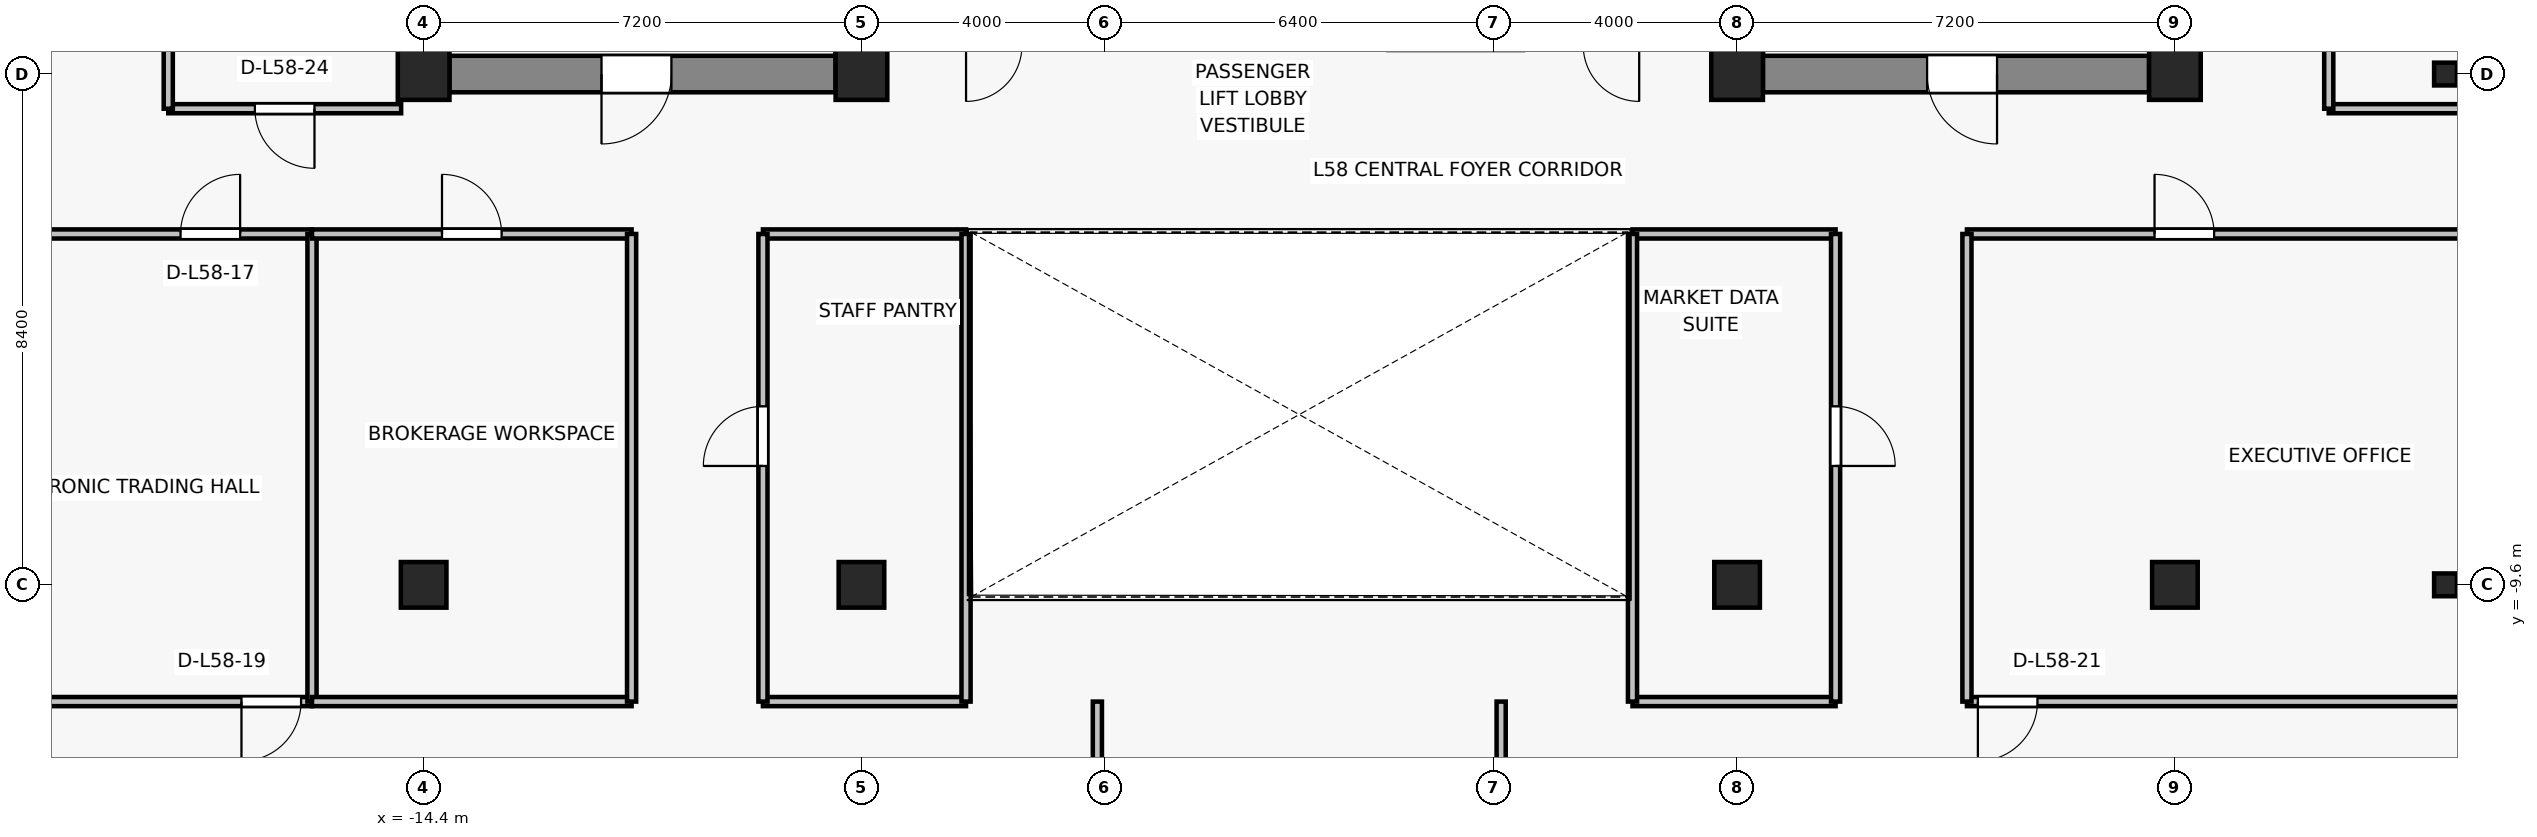
"""IFC4 building model, lengths in metres.
Left out: names, types, materials, properties, quantities, classifications, styles, units other than length and angle.
Written with IfcOpenShell. Run it as: python <this file> out.ifc"""

import sys

from ifc_helpers import new_model, si_unit, direction, frame, frame_2d, origin, origin_2d, place, context, subcontext, project, spatial, rectangle, i_section, extrude, source, transform, mapped, element, fill, save


model = new_model("IFC4")
c1 = context("Model", 3, precision=1e-05, world=origin(), true_north=direction((0.0, 1.0)))
c2 = subcontext(c1, "Body", "Model", "MODEL_VIEW")
j1 = project(units=[si_unit("LENGTHUNIT", "METRE"), si_unit("PLANEANGLEUNIT", "RADIAN")], contexts=[c1])
p1 = place(None, origin())
s1 = spatial("IfcSite", under=j1, at=p1, CompositionType="ELEMENT")
p2 = place(p1, origin())
s2 = spatial("IfcBuilding", under=s1, at=p2, CompositionType="ELEMENT")
p3 = place(p2, frame((0.0, 0.0, 208.9)))
s3 = spatial("IfcBuildingStorey", under=s2, at=p3, CompositionType="ELEMENT", Elevation=208.9)
for number, where, z_axis, x_axis in (
    (1, (-14.4, -1.2, 0.0), (0.0, 0.0, 1.0), (1.0, 0.0, 0.0)),
    (2, (-7.2, -1.2, 0.0), (0.0, 0.0, 1.0), (1.0, 0.0, 0.0)),
    (3, (7.2, -1.2, 0.0), (0.0, 0.0, 1.0), (1.0, 0.0, 0.0)),
    (4, (14.4, -1.2, 0.0), (0.0, 0.0, 1.0), (1.0, 0.0, 0.0)),
):
    element("IfcColumn", number, at=place(p3, frame(where, z_axis=z_axis, x_axis=x_axis)), inside=s3, PredefinedType="COLUMN", context=c2, shape_type="SweptSolid", body=[
        extrude(rectangle(XDim=0.85, YDim=0.85, at=origin_2d()), origin(), (0.0, 0.0, 1.0), 3.3),
    ])
for number, where, z_axis, x_axis in (
    (5, (-14.4, -9.6, 0.0), (0.0, 0.0, 1.0), (1.0, 0.0, 0.0)),
    (6, (-7.2, -9.6, 0.0), (0.0, 0.0, 1.0), (1.0, 0.0, 0.0)),
    (7, (7.2, -9.6, 0.0), (0.0, 0.0, 1.0), (1.0, 0.0, 0.0)),
    (8, (14.4, -9.6, 0.0), (0.0, 0.0, 1.0), (1.0, 0.0, 0.0)),
):
    element("IfcColumn", number, at=place(p3, frame(where, z_axis=z_axis, x_axis=x_axis)), inside=s3, PredefinedType="COLUMN", context=c2, shape_type="SweptSolid", body=[
        extrude(rectangle(XDim=0.75, YDim=0.75, at=origin_2d()), origin(), (0.0, 0.0, 1.0), 3.3),
    ])
for number, where, z_axis, x_axis in (
    (9, (18.85, -9.6, 0.0), (0.0, 0.0, 1.0), (1.0, 0.0, 0.0)),
    (10, (18.85, -1.2, 0.0), (0.0, 0.0, 1.0), (1.0, 0.0, 0.0)),
):
    element("IfcColumn", number, at=place(p3, frame(where, z_axis=z_axis, x_axis=x_axis)), inside=s3, PredefinedType="COLUMN", context=c2, shape_type="SweptSolid", body=[
        extrude(i_section(OverallWidth=0.375, OverallDepth=0.375, WebThickness=0.017, FlangeThickness=0.027, FilletRadius=0.015, at=origin_2d()), origin(), (0.0, 0.0, 1.0), 3.3),
    ])
p4 = place(p3, frame((-7.625, -1.2, 0.0), z_axis=(0.0, 0.0, 1.0), x_axis=(-1.0, 0.0, 0.0)))
e11 = element("IfcWall", 11, at=p4, inside=s3, PredefinedType="SHEAR", context=c2, shape_type="SweptSolid", body=[
    extrude(rectangle(XDim=6.35, YDim=0.6, at=frame_2d((3.175, 0.0))), origin(), (0.0, 0.0, 1.0), 3.075),
])
p5 = place(p4, frame((2.7, 0.0, 0.0)))
e12 = element("IfcOpeningElement", 12, at=p5, cuts=e11, PredefinedType="OPENING", context=c2, shape_type="SweptSolid", body=[
    extrude(rectangle(XDim=1.15, YDim=2.15, at=frame_2d((0.575, 1.075))), frame((0.0, 0.31, 0.0), z_axis=(0.0, -1.0, 0.0), x_axis=(1.0, 0.0, 0.0)), (0.0, 0.0, 1.0), 0.62),
])
p6 = place(p3, frame((13.975, -1.2, 0.0), z_axis=(0.0, 0.0, 1.0), x_axis=(-1.0, 0.0, 0.0)))
e13 = element("IfcWall", 13, at=p6, inside=s3, PredefinedType="SHEAR", context=c2, shape_type="SweptSolid", body=[
    extrude(rectangle(XDim=6.35, YDim=0.6, at=frame_2d((3.175, 0.0))), origin(), (0.0, 0.0, 1.0), 3.075),
])
p7 = place(p6, frame((2.5, 0.0, 0.0)))
e14 = element("IfcOpeningElement", 14, at=p7, cuts=e13, PredefinedType="OPENING", context=c2, shape_type="SweptSolid", body=[
    extrude(rectangle(XDim=1.15, YDim=2.15, at=frame_2d((0.575, 1.075))), frame((0.0, 0.31, 0.0), z_axis=(0.0, -1.0, 0.0), x_axis=(1.0, 0.0, 0.0)), (0.0, 0.0, 1.0), 0.62),
])
for number, where, z_axis, x_axis in (
    (15, (-7.4, -0.9, 0.0), (0.0, 0.0, 1.0), (0.0, 1.0, 0.0)),
    (16, (7.4, -0.9, 0.0), (0.0, 0.0, 1.0), (0.0, 1.0, 0.0)),
):
    element("IfcWall", number, at=place(p3, frame(where, z_axis=z_axis, x_axis=x_axis)), inside=s3, PredefinedType="SHEAR", context=c2, shape_type="SweptSolid", body=[
        extrude(rectangle(XDim=4.15, YDim=0.45, at=frame_2d((2.075, 0.0))), origin(), (0.0, 0.0, 1.0), 3.075),
    ])
p8 = place(p3, frame((-16.236, -11.52, 0.0), z_axis=(0.0, 0.0, 1.0), x_axis=(-1.0, 0.0, 0.0)))
e17 = element("IfcWall", 17, at=p8, inside=s3, PredefinedType="PARTITIONING", context=c2, shape_type="SweptSolid", body=[
    extrude(rectangle(XDim=7.294, YDim=0.15, at=frame_2d((3.647, 0.0))), origin(), (0.0, 0.0, 1.0), 3.075),
])
p9 = place(p8, frame((0.18, 0.0, 0.0)))
e18 = element("IfcOpeningElement", 18, at=p9, cuts=e17, PredefinedType="OPENING", context=c2, shape_type="SweptSolid", body=[
    extrude(rectangle(XDim=0.98, YDim=2.15, at=frame_2d((0.49, 1.075))), frame((0.0, 0.085, 0.0), z_axis=(0.0, -1.0, 0.0), x_axis=(1.0, 0.0, 0.0)), (0.0, 0.0, 1.0), 0.17),
])
p10 = place(p3, frame((-23.53, -3.83, 0.0), z_axis=(0.0, 0.0, 1.0), x_axis=(1.0, 0.0, 0.0)))
e19 = element("IfcWall", 19, at=p10, inside=s3, PredefinedType="PARTITIONING", context=c2, shape_type="SweptSolid", body=[
    extrude(rectangle(XDim=7.294, YDim=0.15, at=frame_2d((3.647, 0.0))), origin(), (0.0, 0.0, 1.0), 2.765),
])
p11 = place(p10, frame((5.132, 0.0, 0.0)))
e20 = element("IfcOpeningElement", 20, at=p11, cuts=e19, PredefinedType="OPENING", context=c2, shape_type="SweptSolid", body=[
    extrude(rectangle(XDim=0.98, YDim=2.15, at=frame_2d((0.49, 1.075))), frame((0.0, 0.085, 0.0), z_axis=(0.0, -1.0, 0.0), x_axis=(1.0, 0.0, 0.0)), (0.0, 0.0, 1.0), 0.17),
])
p12 = place(p3, frame((-16.236, -3.83, 0.0), z_axis=(0.0, 0.0, 1.0), x_axis=(0.0, -1.0, 0.0)))
e21 = element("IfcWall", 21, at=p12, inside=s3, PredefinedType="PARTITIONING", context=c2, shape_type="SweptSolid", body=[
    extrude(rectangle(XDim=7.69, YDim=0.15, at=frame_2d((3.845, 0.0))), origin(), (0.0, 0.0, 1.0), 2.615),
])
p13 = place(p3, frame((-10.98, -11.52, 0.0), z_axis=(0.0, 0.0, 1.0), x_axis=(-1.0, 0.0, 0.0)))
e22 = element("IfcWall", 22, at=p13, inside=s3, PredefinedType="PARTITIONING", context=c2, shape_type="SweptSolid", body=[
    extrude(rectangle(XDim=5.256, YDim=0.15, at=frame_2d((2.628, 0.0))), origin(), (0.0, 0.0, 1.0), 2.615),
])
p14 = place(p3, frame((-16.236, -3.83, 0.0), z_axis=(0.0, 0.0, 1.0), x_axis=(1.0, 0.0, 0.0)))
e23 = element("IfcWall", 23, at=p14, inside=s3, PredefinedType="PARTITIONING", context=c2, shape_type="SweptSolid", body=[
    extrude(rectangle(XDim=5.256, YDim=0.15, at=frame_2d((2.628, 0.0))), origin(), (0.0, 0.0, 1.0), 2.615),
])
p15 = place(p14, frame((2.138, 0.0, 0.0)))
e24 = element("IfcOpeningElement", 24, at=p15, cuts=e23, PredefinedType="OPENING", context=c2, shape_type="SweptSolid", body=[
    extrude(rectangle(XDim=0.98, YDim=2.15, at=frame_2d((0.49, 1.075))), frame((0.0, 0.085, 0.0), z_axis=(0.0, -1.0, 0.0), x_axis=(1.0, 0.0, 0.0)), (0.0, 0.0, 1.0), 0.17),
])
p16 = place(p3, frame((-10.98, -3.83, 0.0), z_axis=(0.0, 0.0, 1.0), x_axis=(0.0, -1.0, 0.0)))
e25 = element("IfcWall", 25, at=p16, inside=s3, PredefinedType="PARTITIONING", context=c2, shape_type="SweptSolid", body=[
    extrude(rectangle(XDim=7.69, YDim=0.15, at=frame_2d((3.845, 0.0))), origin(), (0.0, 0.0, 1.0), 2.615),
])
p17 = place(p3, frame((-3.32, -11.52, 0.0), z_axis=(0.0, 0.0, 1.0), x_axis=(0.0, -1.0, 0.0)))
e26 = element("IfcWall", 26, at=p17, inside=s3, PredefinedType="PARTITIONING", context=c2, shape_type="SweptSolid", body=[
    extrude(rectangle(XDim=5.51, YDim=0.15, at=frame_2d((2.755, 0.0))), origin(), (0.0, 0.0, 1.0), 2.615),
])
p18 = place(p3, frame((19.53, -11.52, 0.0), z_axis=(0.0, 0.0, 1.0), x_axis=(-1.0, 0.0, 0.0)))
e27 = element("IfcWall", 27, at=p18, inside=s3, PredefinedType="PARTITIONING", context=c2, shape_type="SweptSolid", body=[
    extrude(rectangle(XDim=8.55, YDim=0.15, at=frame_2d((4.275, 0.0))), origin(), (0.0, 0.0, 1.0), 2.615),
])
p19 = place(p18, frame((7.39, 0.0, 0.0)))
e28 = element("IfcOpeningElement", 28, at=p19, cuts=e27, PredefinedType="OPENING", context=c2, shape_type="SweptSolid", body=[
    extrude(rectangle(XDim=0.98, YDim=2.15, at=frame_2d((0.49, 1.075))), frame((0.0, 0.085, 0.0), z_axis=(0.0, -1.0, 0.0), x_axis=(1.0, 0.0, 0.0)), (0.0, 0.0, 1.0), 0.17),
])
p20 = place(p3, frame((10.98, -3.83, 0.0), z_axis=(0.0, 0.0, 1.0), x_axis=(1.0, 0.0, 0.0)))
e29 = element("IfcWall", 29, at=p20, inside=s3, PredefinedType="PARTITIONING", context=c2, shape_type="SweptSolid", body=[
    extrude(rectangle(XDim=8.55, YDim=0.15, at=frame_2d((4.275, 0.0))), origin(), (0.0, 0.0, 1.0), 2.615),
])
p21 = place(p20, frame((3.085, 0.0, 0.0)))
e30 = element("IfcOpeningElement", 30, at=p21, cuts=e29, PredefinedType="OPENING", context=c2, shape_type="SweptSolid", body=[
    extrude(rectangle(XDim=0.98, YDim=2.15, at=frame_2d((0.49, 1.075))), frame((0.0, 0.085, 0.0), z_axis=(0.0, -1.0, 0.0), x_axis=(1.0, 0.0, 0.0)), (0.0, 0.0, 1.0), 0.17),
])
p22 = place(p3, frame((10.98, -11.52, 0.0), z_axis=(0.0, 0.0, 1.0), x_axis=(0.0, 1.0, 0.0)))
e31 = element("IfcWall", 31, at=p22, inside=s3, PredefinedType="PARTITIONING", context=c2, shape_type="SweptSolid", body=[
    extrude(rectangle(XDim=7.69, YDim=0.15, at=frame_2d((3.845, 0.0))), origin(), (0.0, 0.0, 1.0), 2.615),
])
p23 = place(p3, frame((3.32, -17.03, 0.0), z_axis=(0.0, 0.0, 1.0), x_axis=(0.0, 1.0, 0.0)))
e32 = element("IfcWall", 32, at=p23, inside=s3, PredefinedType="PARTITIONING", context=c2, shape_type="SweptSolid", body=[
    extrude(rectangle(XDim=5.51, YDim=0.15, at=frame_2d((2.755, 0.0))), origin(), (0.0, 0.0, 1.0), 2.615),
])
for number, where, z_axis, x_axis in (
    (33, (-5.48, -11.52, 0.0), (0.0, 0.0, 1.0), (-1.0, 0.0, 0.0)),
    (34, (-8.82, -3.83, 0.0), (0.0, 0.0, 1.0), (1.0, 0.0, 0.0)),
):
    element("IfcWall", number, at=place(p3, frame(where, z_axis=z_axis, x_axis=x_axis)), inside=s3, PredefinedType="PARTITIONING", context=c2, shape_type="SweptSolid", body=[
        extrude(rectangle(XDim=3.34, YDim=0.15, at=frame_2d((1.67, 0.0))), origin(), (0.0, 0.0, 1.0), 2.615),
    ])
p24 = place(p3, frame((-8.82, -11.52, 0.0), z_axis=(0.0, 0.0, 1.0), x_axis=(0.0, 1.0, 0.0)))
e35 = element("IfcWall", 35, at=p24, inside=s3, PredefinedType="PARTITIONING", context=c2, shape_type="SweptSolid", body=[
    extrude(rectangle(XDim=7.69, YDim=0.15, at=frame_2d((3.845, 0.0))), origin(), (0.0, 0.0, 1.0), 2.615),
])
p25 = place(p24, frame((3.875, 0.0, 0.0)))
e36 = element("IfcOpeningElement", 36, at=p25, cuts=e35, PredefinedType="OPENING", context=c2, shape_type="SweptSolid", body=[
    extrude(rectangle(XDim=0.98, YDim=2.15, at=frame_2d((0.49, 1.075))), frame((0.0, 0.085, 0.0), z_axis=(0.0, -1.0, 0.0), x_axis=(1.0, 0.0, 0.0)), (0.0, 0.0, 1.0), 0.17),
])
p26 = place(p3, frame((-5.48, -3.83, 0.0), z_axis=(0.0, 0.0, 1.0), x_axis=(0.0, -1.0, 0.0)))
e37 = element("IfcWall", 37, at=p26, inside=s3, PredefinedType="PARTITIONING", context=c2, shape_type="SweptSolid", body=[
    extrude(rectangle(XDim=7.69, YDim=0.15, at=frame_2d((3.845, 0.0))), origin(), (0.0, 0.0, 1.0), 2.615),
])
for number, where, z_axis, x_axis in (
    (38, (8.82, -11.52, 0.0), (0.0, 0.0, 1.0), (-1.0, 0.0, 0.0)),
    (39, (5.48, -3.83, 0.0), (0.0, 0.0, 1.0), (1.0, 0.0, 0.0)),
):
    element("IfcWall", number, at=place(p3, frame(where, z_axis=z_axis, x_axis=x_axis)), inside=s3, PredefinedType="PARTITIONING", context=c2, shape_type="SweptSolid", body=[
        extrude(rectangle(XDim=3.34, YDim=0.15, at=frame_2d((1.67, 0.0))), origin(), (0.0, 0.0, 1.0), 2.615),
    ])
p27 = place(p3, frame((5.48, -11.52, 0.0), z_axis=(0.0, 0.0, 1.0), x_axis=(0.0, 1.0, 0.0)))
e40 = element("IfcWall", 40, at=p27, inside=s3, PredefinedType="PARTITIONING", context=c2, shape_type="SweptSolid", body=[
    extrude(rectangle(XDim=7.69, YDim=0.15, at=frame_2d((3.845, 0.0))), origin(), (0.0, 0.0, 1.0), 2.615),
])
p28 = place(p3, frame((8.82, -3.83, 0.0), z_axis=(0.0, 0.0, 1.0), x_axis=(0.0, -1.0, 0.0)))
e41 = element("IfcWall", 41, at=p28, inside=s3, PredefinedType="PARTITIONING", context=c2, shape_type="SweptSolid", body=[
    extrude(rectangle(XDim=7.69, YDim=0.15, at=frame_2d((3.845, 0.0))), origin(), (0.0, 0.0, 1.0), 2.615),
])
p29 = place(p28, frame((2.835, 0.0, 0.0)))
e42 = element("IfcOpeningElement", 42, at=p29, cuts=e41, PredefinedType="OPENING", context=c2, shape_type="SweptSolid", body=[
    extrude(rectangle(XDim=0.98, YDim=2.15, at=frame_2d((0.49, 1.075))), frame((0.0, 0.085, 0.0), z_axis=(0.0, -1.0, 0.0), x_axis=(1.0, 0.0, 0.0)), (0.0, 0.0, 1.0), 0.17),
])
p30 = place(p3, frame((-14.77, -1.77, 0.0), z_axis=(0.0, 0.0, 1.0), x_axis=(-1.0, 0.0, 0.0)))
e43 = element("IfcWall", 43, at=p30, inside=s3, PredefinedType="PARTITIONING", context=c2, shape_type="SweptSolid", body=[
    extrude(rectangle(XDim=3.83, YDim=0.15, at=frame_2d((1.915, 0.0))), origin(), (0.0, 0.0, 1.0), 3.075),
])
p31 = place(p30, frame((1.425, 0.0, 0.0)))
e44 = element("IfcOpeningElement", 44, at=p31, cuts=e43, PredefinedType="OPENING", context=c2, shape_type="SweptSolid", body=[
    extrude(rectangle(XDim=0.98, YDim=2.15, at=frame_2d((0.49, 1.075))), frame((0.0, 0.085, 0.0), z_axis=(0.0, -1.0, 0.0), x_axis=(1.0, 0.0, 0.0)), (0.0, 0.0, 1.0), 0.17),
])
p32 = place(p3, frame((-18.6, -1.77, 0.0), z_axis=(0.0, 0.0, 1.0), x_axis=(0.0, 1.0, 0.0)))
e45 = element("IfcWall", 45, at=p32, inside=s3, PredefinedType="PARTITIONING", context=c2, shape_type="SweptSolid", body=[
    extrude(rectangle(XDim=15.65, YDim=0.15, at=frame_2d((7.825, 0.0))), origin(), (0.0, 0.0, 1.0), 2.615),
])
p33 = place(p3, frame((19.53, -1.77, 0.0), z_axis=(0.0, 0.0, 1.0), x_axis=(-1.0, 0.0, 0.0)))
e46 = element("IfcWall", 46, at=p33, inside=s3, PredefinedType="PARTITIONING", context=c2, shape_type="SweptSolid", body=[
    extrude(rectangle(XDim=2.6, YDim=0.15, at=frame_2d((1.3, 0.0))), origin(), (0.0, 0.0, 1.0), 2.765),
])
p34 = place(p3, frame((16.93, -1.77, 0.0), z_axis=(0.0, 0.0, 1.0), x_axis=(0.0, 1.0, 0.0)))
e47 = element("IfcWall", 47, at=p34, inside=s3, PredefinedType="PARTITIONING", context=c2, shape_type="SweptSolid", body=[
    extrude(rectangle(XDim=4.757, YDim=0.15, at=frame_2d((2.378, 0.0))), origin(), (0.0, 0.0, 1.0), 2.615),
])
p35 = place(p34, frame((1.889, 0.0, 0.0)))
e48 = element("IfcOpeningElement", 48, at=p35, cuts=e47, PredefinedType="OPENING", context=c2, shape_type="SweptSolid", body=[
    extrude(rectangle(XDim=0.98, YDim=2.15, at=frame_2d((0.49, 1.075))), frame((0.0, 0.085, 0.0), z_axis=(0.0, -1.0, 0.0), x_axis=(1.0, 0.0, 0.0)), (0.0, 0.0, 1.0), 0.17),
])
m1 = source(origin(), c2, "Body", "SweptSolid", [
    extrude(rectangle(XDim=1.15, YDim=2.15, at=frame_2d((0.575, 1.075))), frame((0.0, 0.025, 0.0), z_axis=(0.0, -1.0, 0.0), x_axis=(1.0, 0.0, 0.0)), (0.0, 0.0, 1.0), 0.05),
])
p36 = place(p5, origin())
e49 = element("IfcDoor", 49, at=p36, inside=s3, OperationType="SINGLE_SWING_RIGHT", PredefinedType="DOOR", context=c2, shape_type="MappedRepresentation", body=[
    mapped(m1, transform((0.0, 0.0, 0.0), x_axis=(1.0, 0.0, 0.0), y_axis=(0.0, 1.0, 0.0), z_axis=(0.0, 0.0, 1.0), scale=1.0)),
])
fill(e12, e49)
p37 = place(p7, origin())
e50 = element("IfcDoor", 50, at=p37, inside=s3, OperationType="SINGLE_SWING_LEFT", PredefinedType="DOOR", context=c2, shape_type="MappedRepresentation", body=[
    mapped(m1, transform((0.0, 0.0, 0.0), x_axis=(1.0, 0.0, 0.0), y_axis=(0.0, 1.0, 0.0), z_axis=(0.0, 0.0, 1.0), scale=1.0)),
])
fill(e14, e50)
m2 = source(origin(), c2, "Body", "SweptSolid", [
    extrude(rectangle(XDim=0.98, YDim=2.15, at=frame_2d((0.49, 1.075))), frame((0.0, 0.025, 0.0), z_axis=(0.0, -1.0, 0.0), x_axis=(1.0, 0.0, 0.0)), (0.0, 0.0, 1.0), 0.05),
])
p38 = place(p11, origin())
e51 = element("IfcDoor", 51, at=p38, inside=s3, OperationType="SINGLE_SWING_RIGHT", PredefinedType="DOOR", context=c2, shape_type="MappedRepresentation", body=[
    mapped(m2, transform((0.0, 0.0, 0.0), x_axis=(1.0, 0.0, 0.0), y_axis=(0.0, 1.0, 0.0), z_axis=(0.0, 0.0, 1.0), scale=1.0)),
])
fill(e20, e51)
p39 = place(p15, origin())
e52 = element("IfcDoor", 52, at=p39, inside=s3, OperationType="SINGLE_SWING_LEFT", PredefinedType="DOOR", context=c2, shape_type="MappedRepresentation", body=[
    mapped(m2, transform((0.0, 0.0, 0.0), x_axis=(1.0, 0.0, 0.0), y_axis=(0.0, 1.0, 0.0), z_axis=(0.0, 0.0, 1.0), scale=1.0)),
])
fill(e24, e52)
p40 = place(p9, origin())
e53 = element("IfcDoor", 53, at=p40, inside=s3, OperationType="SINGLE_SWING_RIGHT", PredefinedType="DOOR", context=c2, shape_type="MappedRepresentation", body=[
    mapped(m2, transform((0.0, 0.0, 0.0), x_axis=(1.0, 0.0, 0.0), y_axis=(0.0, 1.0, 0.0), z_axis=(0.0, 0.0, 1.0), scale=1.0)),
])
fill(e18, e53)
p41 = place(p21, origin())
e54 = element("IfcDoor", 54, at=p41, inside=s3, OperationType="SINGLE_SWING_LEFT", PredefinedType="DOOR", context=c2, shape_type="MappedRepresentation", body=[
    mapped(m2, transform((0.0, 0.0, 0.0), x_axis=(1.0, 0.0, 0.0), y_axis=(0.0, 1.0, 0.0), z_axis=(0.0, 0.0, 1.0), scale=1.0)),
])
fill(e30, e54)
p42 = place(p19, origin())
e55 = element("IfcDoor", 55, at=p42, inside=s3, OperationType="SINGLE_SWING_RIGHT", PredefinedType="DOOR", context=c2, shape_type="MappedRepresentation", body=[
    mapped(m2, transform((0.0, 0.0, 0.0), x_axis=(1.0, 0.0, 0.0), y_axis=(0.0, 1.0, 0.0), z_axis=(0.0, 0.0, 1.0), scale=1.0)),
])
fill(e28, e55)
p43 = place(p25, origin())
e56 = element("IfcDoor", 56, at=p43, inside=s3, OperationType="SINGLE_SWING_LEFT", PredefinedType="DOOR", context=c2, shape_type="MappedRepresentation", body=[
    mapped(m2, transform((0.0, 0.0, 0.0), x_axis=(1.0, 0.0, 0.0), y_axis=(0.0, 1.0, 0.0), z_axis=(0.0, 0.0, 1.0), scale=1.0)),
])
fill(e36, e56)
p44 = place(p29, origin())
e57 = element("IfcDoor", 57, at=p44, inside=s3, OperationType="SINGLE_SWING_RIGHT", PredefinedType="DOOR", context=c2, shape_type="MappedRepresentation", body=[
    mapped(m2, transform((0.0, 0.0, 0.0), x_axis=(1.0, 0.0, 0.0), y_axis=(0.0, 1.0, 0.0), z_axis=(0.0, 0.0, 1.0), scale=1.0)),
])
fill(e42, e57)
p45 = place(p31, origin())
e58 = element("IfcDoor", 58, at=p45, inside=s3, OperationType="SINGLE_SWING_LEFT", PredefinedType="DOOR", context=c2, shape_type="MappedRepresentation", body=[
    mapped(m2, transform((0.0, 0.0, 0.0), x_axis=(1.0, 0.0, 0.0), y_axis=(0.0, 1.0, 0.0), z_axis=(0.0, 0.0, 1.0), scale=1.0)),
])
fill(e44, e58)
save(model, sys.argv[1])
